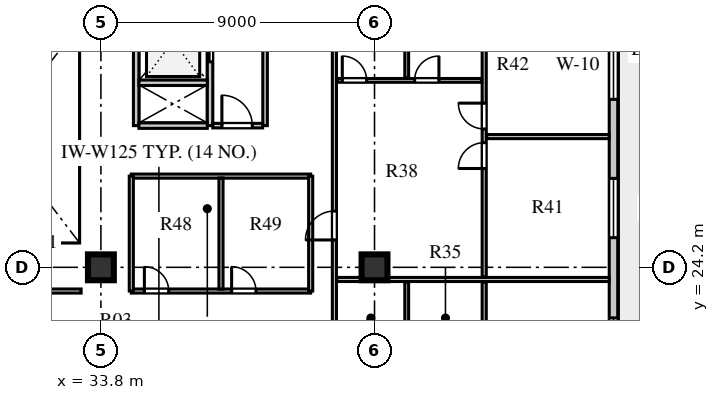
"""IFC4 building model, lengths in metres.
Left out: names, types, materials, properties, quantities, classifications, styles, units other than length and angle.
Written with IfcOpenShell. Run it as: python <this file> out.ifc"""

import sys

from ifc_helpers import new_model, si_unit, direction, frame, frame_2d, origin, origin_2d, place, context, subcontext, project, spatial, rectangle, extrude, element, fill, save


model = new_model("IFC4")
c1 = context("Model", 3, precision=1e-05, world=origin(), true_north=direction((0.0, 1.0)))
c2 = subcontext(c1, "Body", "Model", "MODEL_VIEW")
j1 = project(units=[si_unit("LENGTHUNIT", "METRE"), si_unit("PLANEANGLEUNIT", "RADIAN")], contexts=[c1])
p1 = place(None, origin())
s1 = spatial("IfcSite", under=j1, at=p1, CompositionType="ELEMENT")
p2 = place(p1, origin())
s2 = spatial("IfcBuilding", under=s1, at=p2, CompositionType="ELEMENT")
p3 = place(p2, frame((0.0, 0.0, 229.7)))
s3 = spatial("IfcBuildingStorey", under=s2, at=p3, CompositionType="ELEMENT", Elevation=229.7)
for number, where, z_axis, x_axis in (
    (1, (33.8, 24.2, 0.0), (0.0, 0.0, 1.0), (1.0, 0.0, 0.0)),
    (2, (42.8, 24.2, 0.0), (0.0, 0.0, 1.0), (1.0, 0.0, 0.0)),
):
    element("IfcColumn", number, at=place(p3, frame(where, z_axis=z_axis, x_axis=x_axis)), inside=s3, PredefinedType="COLUMN", context=c2, shape_type="SweptSolid", body=[
        extrude(rectangle(XDim=0.85, YDim=0.85, at=origin_2d()), origin(), (0.0, 0.0, 1.0), 3.66),
    ])
p4 = place(p3, frame((50.66, 13.13, 0.0), z_axis=(0.0, 0.0, 1.0), x_axis=(0.0, 1.0, 0.0)))
e3 = element("IfcWall", 3, at=p4, inside=s3, PredefinedType="STANDARD", context=c2, shape_type="SweptSolid", body=[
    extrude(rectangle(XDim=30.94, YDim=0.28, at=frame_2d((15.47, 0.0))), origin(), (0.0, 0.0, 1.0), 3.66),
])
p5 = place(p4, frame((0.67, 0.0, 0.0)))
e4 = element("IfcOpeningElement", 4, at=p5, cuts=e3, PredefinedType="OPENING", context=c2, shape_type="SweptSolid", body=[
    extrude(rectangle(XDim=1.0, YDim=2.05, at=frame_2d((0.5, 1.025))), frame((0.0, 0.15, 0.0), z_axis=(0.0, -1.0, 0.0), x_axis=(1.0, 0.0, 0.0)), (0.0, 0.0, 1.0), 0.3),
])
p6 = place(p4, frame((3.683, 0.0, 0.8)))
e5 = element("IfcOpeningElement", 5, at=p6, cuts=e3, PredefinedType="OPENING", context=c2, shape_type="SweptSolid", body=[
    extrude(rectangle(XDim=1.35, YDim=1.9, at=frame_2d((0.675, 0.95))), frame((0.0, 0.15, 0.0), z_axis=(0.0, -1.0, 0.0), x_axis=(1.0, 0.0, 0.0)), (0.0, 0.0, 1.0), 0.3),
])
p7 = place(p4, frame((7.757, 0.0, 0.8)))
e6 = element("IfcOpeningElement", 6, at=p7, cuts=e3, PredefinedType="OPENING", context=c2, shape_type="SweptSolid", body=[
    extrude(rectangle(XDim=1.65, YDim=1.95, at=frame_2d((0.825, 0.975))), frame((0.0, 0.15, 0.0), z_axis=(0.0, -1.0, 0.0), x_axis=(1.0, 0.0, 0.0)), (0.0, 0.0, 1.0), 0.3),
])
p8 = place(p4, frame((12.045, 0.0, 0.8)))
e7 = element("IfcOpeningElement", 7, at=p8, cuts=e3, PredefinedType="OPENING", context=c2, shape_type="SweptSolid", body=[
    extrude(rectangle(XDim=1.95, YDim=2.0, at=frame_2d((0.975, 1.0))), frame((0.0, 0.15, 0.0), z_axis=(0.0, -1.0, 0.0), x_axis=(1.0, 0.0, 0.0)), (0.0, 0.0, 1.0), 0.3),
])
p9 = place(p4, frame((16.595, 0.0, 0.8)))
e8 = element("IfcOpeningElement", 8, at=p9, cuts=e3, PredefinedType="OPENING", context=c2, shape_type="SweptSolid", body=[
    extrude(rectangle(XDim=2.25, YDim=2.0, at=frame_2d((1.125, 1.0))), frame((0.0, 0.15, 0.0), z_axis=(0.0, -1.0, 0.0), x_axis=(1.0, 0.0, 0.0)), (0.0, 0.0, 1.0), 0.3),
])
p10 = place(p4, frame((21.307, 0.0, 0.8)))
e9 = element("IfcOpeningElement", 9, at=p10, cuts=e3, PredefinedType="OPENING", context=c2, shape_type="SweptSolid", body=[
    extrude(rectangle(XDim=1.8, YDim=2.0, at=frame_2d((0.9, 1.0))), frame((0.0, 0.15, 0.0), z_axis=(0.0, -1.0, 0.0), x_axis=(1.0, 0.0, 0.0)), (0.0, 0.0, 1.0), 0.3),
])
p11 = place(p4, frame((25.782, 0.0, 0.8)))
e10 = element("IfcOpeningElement", 10, at=p11, cuts=e3, PredefinedType="OPENING", context=c2, shape_type="SweptSolid", body=[
    extrude(rectangle(XDim=1.5, YDim=2.0, at=frame_2d((0.75, 1.0))), frame((0.0, 0.15, 0.0), z_axis=(0.0, -1.0, 0.0), x_axis=(1.0, 0.0, 0.0)), (0.0, 0.0, 1.0), 0.3),
])
p12 = place(p4, frame((29.175, 0.0, 0.8)))
e11 = element("IfcOpeningElement", 11, at=p12, cuts=e3, PredefinedType="OPENING", context=c2, shape_type="SweptSolid", body=[
    extrude(rectangle(XDim=1.2, YDim=1.75, at=frame_2d((0.6, 0.875))), frame((0.0, 0.15, 0.0), z_axis=(0.0, -1.0, 0.0), x_axis=(1.0, 0.0, 0.0)), (0.0, 0.0, 1.0), 0.3),
])
p13 = place(p3, frame((34.96, 28.86, 0.0), z_axis=(0.0, 0.0, 1.0), x_axis=(0.0, 1.0, 0.0)))
e12 = element("IfcWall", 12, at=p13, inside=s3, PredefinedType="SOLIDWALL", context=c2, shape_type="SweptSolid", body=[
    extrude(rectangle(XDim=4.22, YDim=0.18, at=frame_2d((2.11, 0.0))), origin(), (0.0, 0.0, 1.0), 3.66),
])
p14 = place(p3, frame((37.39, 28.86, 0.0), z_axis=(0.0, 0.0, 1.0), x_axis=(0.0, 1.0, 0.0)))
e13 = element("IfcWall", 13, at=p14, inside=s3, PredefinedType="SOLIDWALL", context=c2, shape_type="SweptSolid", body=[
    extrude(rectangle(XDim=4.22, YDim=0.18, at=frame_2d((2.11, 0.0))), origin(), (0.0, 0.0, 1.0), 3.66),
])
p15 = place(p14, frame((2.1, 0.0, 0.0)))
e14 = element("IfcOpeningElement", 14, at=p15, cuts=e13, PredefinedType="OPENING", context=c2, shape_type="SweptSolid", body=[
    extrude(rectangle(XDim=1.2, YDim=2.12, at=frame_2d((0.6, 1.06))), frame((0.0, 0.1, 0.0), z_axis=(0.0, -1.0, 0.0), x_axis=(1.0, 0.0, 0.0)), (0.0, 0.0, 1.0), 0.2),
])
for number, where, z_axis, x_axis in (
    (15, (35.05, 28.86, 0.0), (0.0, 0.0, 1.0), (1.0, 0.0, 0.0)),
    (16, (35.05, 30.27, 0.0), (0.0, 0.0, 1.0), (1.0, 0.0, 0.0)),
):
    element("IfcWall", number, at=place(p3, frame(where, z_axis=z_axis, x_axis=x_axis)), inside=s3, PredefinedType="SOLIDWALL", context=c2, shape_type="SweptSolid", body=[
        extrude(rectangle(XDim=2.25, YDim=0.18, at=frame_2d((1.125, 0.0))), origin(), (0.0, 0.0, 1.0), 3.66),
    ])
p16 = place(p3, frame((39.2, 28.86, 0.0), z_axis=(0.0, 0.0, 1.0), x_axis=(0.0, 1.0, 0.0)))
e17 = element("IfcWall", 17, at=p16, inside=s3, PredefinedType="PARTITIONING", context=c2, shape_type="SweptSolid", body=[
    extrude(rectangle(XDim=4.22, YDim=0.15, at=frame_2d((2.11, 0.0))), origin(), (0.0, 0.0, 1.0), 3.66),
])
p17 = place(p3, frame((37.48, 28.86, 0.0), z_axis=(0.0, 0.0, 1.0), x_axis=(1.0, 0.0, 0.0)))
e18 = element("IfcWall", 18, at=p17, inside=s3, PredefinedType="PARTITIONING", context=c2, shape_type="SweptSolid", body=[
    extrude(rectangle(XDim=1.64, YDim=0.15, at=frame_2d((0.82, 0.0))), origin(), (0.0, 0.0, 1.0), 3.66),
])
p18 = place(p17, frame((0.3, 0.0, 0.0)))
e19 = element("IfcOpeningElement", 19, at=p18, cuts=e18, PredefinedType="OPENING", context=c2, shape_type="SweptSolid", body=[
    extrude(rectangle(XDim=1.0, YDim=2.1, at=frame_2d((0.5, 1.05))), frame((0.0, 0.085, 0.0), z_axis=(0.0, -1.0, 0.0), x_axis=(1.0, 0.0, 0.0)), (0.0, 0.0, 1.0), 0.17),
])
p19 = place(p3, frame((27.15, 23.42, 0.0), z_axis=(0.0, 0.0, 1.0), x_axis=(1.0, 0.0, 0.0)))
e20 = element("IfcWall", 20, at=p19, inside=s3, PredefinedType="PARTITIONING", context=c2, shape_type="SweptSolid", body=[
    extrude(rectangle(XDim=6.0, YDim=0.135, at=frame_2d((3.0, 0.0))), origin(), (0.0, 0.0, 1.0), 3.66),
])
p20 = place(p3, frame((41.48, 15.35, 0.0), z_axis=(0.0, 0.0, 1.0), x_axis=(0.0, 1.0, 0.0)))
e21 = element("IfcWall", 21, at=p20, inside=s3, PredefinedType="PARTITIONING", context=c2, shape_type="SweptSolid", body=[
    extrude(rectangle(XDim=26.5, YDim=0.135, at=frame_2d((13.25, 0.0))), origin(), (0.0, 0.0, 1.0), 3.66),
])
p21 = place(p20, frame((0.75, 0.0, 0.0)))
e22 = element("IfcOpeningElement", 22, at=p21, cuts=e21, PredefinedType="OPENING", context=c2, shape_type="SweptSolid", body=[
    extrude(rectangle(XDim=0.95, YDim=2.1, at=frame_2d((0.475, 1.05))), frame((0.0, 0.078, 0.0), z_axis=(0.0, -1.0, 0.0), x_axis=(1.0, 0.0, 0.0)), (0.0, 0.0, 1.0), 0.155),
])
p22 = place(p20, frame((9.75, 0.0, 0.0)))
e23 = element("IfcOpeningElement", 23, at=p22, cuts=e21, PredefinedType="OPENING", context=c2, shape_type="SweptSolid", body=[
    extrude(rectangle(XDim=0.95, YDim=2.1, at=frame_2d((0.475, 1.05))), frame((0.0, 0.078, 0.0), z_axis=(0.0, -1.0, 0.0), x_axis=(1.0, 0.0, 0.0)), (0.0, 0.0, 1.0), 0.155),
])
p23 = place(p20, frame((18.5, 0.0, 0.0)))
e24 = element("IfcOpeningElement", 24, at=p23, cuts=e21, PredefinedType="OPENING", context=c2, shape_type="SweptSolid", body=[
    extrude(rectangle(XDim=0.95, YDim=2.1, at=frame_2d((0.475, 1.05))), frame((0.0, 0.078, 0.0), z_axis=(0.0, -1.0, 0.0), x_axis=(1.0, 0.0, 0.0)), (0.0, 0.0, 1.0), 0.155),
])
p24 = place(p3, frame((46.408, 15.53, 0.0), z_axis=(0.0, 0.0, 1.0), x_axis=(0.0, 1.0, 0.0)))
e25 = element("IfcWall", 25, at=p24, inside=s3, PredefinedType="PARTITIONING", context=c2, shape_type="SweptSolid", body=[
    extrude(rectangle(XDim=8.19, YDim=0.135, at=frame_2d((4.095, 0.0))), origin(), (0.0, 0.0, 1.0), 3.66),
])
p25 = place(p24, frame((3.045, 0.0, 0.0)))
e26 = element("IfcOpeningElement", 26, at=p25, cuts=e25, PredefinedType="OPENING", context=c2, shape_type="SweptSolid", body=[
    extrude(rectangle(XDim=0.85, YDim=2.08, at=frame_2d((0.425, 1.04))), frame((0.0, 0.078, 0.0), z_axis=(0.0, -1.0, 0.0), x_axis=(1.0, 0.0, 0.0)), (0.0, 0.0, 1.0), 0.155),
])
p26 = place(p24, frame((4.345, 0.0, 0.0)))
e27 = element("IfcOpeningElement", 27, at=p26, cuts=e25, PredefinedType="OPENING", context=c2, shape_type="SweptSolid", body=[
    extrude(rectangle(XDim=0.85, YDim=2.08, at=frame_2d((0.425, 1.04))), frame((0.0, 0.078, 0.0), z_axis=(0.0, -1.0, 0.0), x_axis=(1.0, 0.0, 0.0)), (0.0, 0.0, 1.0), 0.155),
])
p27 = place(p3, frame((43.859, 21.343, 0.0), z_axis=(0.0, 0.0, 1.0), x_axis=(0.0, 1.0, 0.0)))
e28 = element("IfcWall", 28, at=p27, inside=s3, PredefinedType="PLUMBINGWALL", context=c2, shape_type="SweptSolid", body=[
    extrude(rectangle(XDim=2.377, YDim=0.125, at=frame_2d((1.188, 0.0))), origin(), (0.0, 0.0, 1.0), 3.66),
])
p28 = place(p3, frame((41.56, 23.8, 0.0), z_axis=(0.0, 0.0, 1.0), x_axis=(1.0, 0.0, 0.0)))
e29 = element("IfcWall", 29, at=p28, inside=s3, PredefinedType="PARTITIONING", context=c2, shape_type="SweptSolid", body=[
    extrude(rectangle(XDim=8.96, YDim=0.135, at=frame_2d((4.48, 0.0))), origin(), (0.0, 0.0, 1.0), 3.66),
])
p29 = place(p3, frame((46.408, 23.88, 0.0), z_axis=(0.0, 0.0, 1.0), x_axis=(0.0, 1.0, 0.0)))
e30 = element("IfcWall", 30, at=p29, inside=s3, PredefinedType="PARTITIONING", context=c2, shape_type="SweptSolid", body=[
    extrude(rectangle(XDim=9.24, YDim=0.135, at=frame_2d((4.62, 0.0))), origin(), (0.0, 0.0, 1.0), 3.66),
])
p30 = place(p29, frame((3.57, 0.0, 0.0)))
e31 = element("IfcOpeningElement", 31, at=p30, cuts=e30, PredefinedType="OPENING", context=c2, shape_type="SweptSolid", body=[
    extrude(rectangle(XDim=0.85, YDim=2.08, at=frame_2d((0.425, 1.04))), frame((0.0, 0.078, 0.0), z_axis=(0.0, -1.0, 0.0), x_axis=(1.0, 0.0, 0.0)), (0.0, 0.0, 1.0), 0.155),
])
p31 = place(p29, frame((4.87, 0.0, 0.0)))
e32 = element("IfcOpeningElement", 32, at=p31, cuts=e30, PredefinedType="OPENING", context=c2, shape_type="SweptSolid", body=[
    extrude(rectangle(XDim=0.85, YDim=2.08, at=frame_2d((0.425, 1.04))), frame((0.0, 0.078, 0.0), z_axis=(0.0, -1.0, 0.0), x_axis=(1.0, 0.0, 0.0)), (0.0, 0.0, 1.0), 0.155),
])
p32 = place(p3, frame((41.58, 30.348, 0.0), z_axis=(0.0, 0.0, 1.0), x_axis=(1.0, 0.0, 0.0)))
e33 = element("IfcWall", 33, at=p32, inside=s3, PredefinedType="PLUMBINGWALL", context=c2, shape_type="SweptSolid", body=[
    extrude(rectangle(XDim=4.748, YDim=0.125, at=frame_2d((2.374, 0.0))), origin(), (0.0, 0.0, 1.0), 3.66),
])
p33 = place(p32, frame((0.16, 0.0, 0.0)))
e34 = element("IfcOpeningElement", 34, at=p33, cuts=e33, PredefinedType="OPENING", context=c2, shape_type="SweptSolid", body=[
    extrude(rectangle(XDim=0.8, YDim=2.05, at=frame_2d((0.4, 1.025))), frame((0.0, 0.073, 0.0), z_axis=(0.0, -1.0, 0.0), x_axis=(1.0, 0.0, 0.0)), (0.0, 0.0, 1.0), 0.145),
])
p34 = place(p32, frame((2.539, 0.0, 0.0)))
e35 = element("IfcOpeningElement", 35, at=p34, cuts=e33, PredefinedType="OPENING", context=c2, shape_type="SweptSolid", body=[
    extrude(rectangle(XDim=0.8, YDim=2.05, at=frame_2d((0.4, 1.025))), frame((0.0, 0.073, 0.0), z_axis=(0.0, -1.0, 0.0), x_axis=(1.0, 0.0, 0.0)), (0.0, 0.0, 1.0), 0.145),
])
p35 = place(p3, frame((43.859, 30.428, 0.0), z_axis=(0.0, 0.0, 1.0), x_axis=(0.0, 1.0, 0.0)))
e36 = element("IfcWall", 36, at=p35, inside=s3, PredefinedType="PLUMBINGWALL", context=c2, shape_type="SweptSolid", body=[
    extrude(rectangle(XDim=2.692, YDim=0.125, at=frame_2d((1.346, 0.0))), origin(), (0.0, 0.0, 1.0), 3.66),
])
p36 = place(p3, frame((46.488, 28.5, 0.0), z_axis=(0.0, 0.0, 1.0), x_axis=(1.0, 0.0, 0.0)))
e37 = element("IfcWall", 37, at=p36, inside=s3, PredefinedType="PARTITIONING", context=c2, shape_type="SweptSolid", body=[
    extrude(rectangle(XDim=4.032, YDim=0.135, at=frame_2d((2.016, 0.0))), origin(), (0.0, 0.0, 1.0), 3.66),
])
p37 = place(p3, frame((34.8, 23.42, 0.0), z_axis=(0.0, 0.0, 1.0), x_axis=(1.0, 0.0, 0.0)))
e38 = element("IfcWall", 38, at=p37, inside=s3, PredefinedType="PARTITIONING", context=c2, shape_type="SweptSolid", body=[
    extrude(rectangle(XDim=5.9, YDim=0.135, at=frame_2d((2.95, 0.0))), origin(), (0.0, 0.0, 1.0), 3.66),
])
p38 = place(p37, frame((0.43, 0.0, 0.0)))
e39 = element("IfcOpeningElement", 39, at=p38, cuts=e38, PredefinedType="OPENING", context=c2, shape_type="SweptSolid", body=[
    extrude(rectangle(XDim=0.8, YDim=2.05, at=frame_2d((0.4, 1.025))), frame((0.0, 0.078, 0.0), z_axis=(0.0, -1.0, 0.0), x_axis=(1.0, 0.0, 0.0)), (0.0, 0.0, 1.0), 0.155),
])
p39 = place(p37, frame((3.3, 0.0, 0.0)))
e40 = element("IfcOpeningElement", 40, at=p39, cuts=e38, PredefinedType="OPENING", context=c2, shape_type="SweptSolid", body=[
    extrude(rectangle(XDim=0.8, YDim=2.05, at=frame_2d((0.4, 1.025))), frame((0.0, 0.078, 0.0), z_axis=(0.0, -1.0, 0.0), x_axis=(1.0, 0.0, 0.0)), (0.0, 0.0, 1.0), 0.155),
])
p40 = place(p3, frame((34.8, 27.2, 0.0), z_axis=(0.0, 0.0, 1.0), x_axis=(1.0, 0.0, 0.0)))
e41 = element("IfcWall", 41, at=p40, inside=s3, PredefinedType="PARTITIONING", context=c2, shape_type="SweptSolid", body=[
    extrude(rectangle(XDim=5.9, YDim=0.135, at=frame_2d((2.95, 0.0))), origin(), (0.0, 0.0, 1.0), 3.31),
])
for number, where, z_axis, x_axis in (
    (42, (34.8, 23.42, 0.0), (0.0, 0.0, 1.0), (0.0, 1.0, 0.0)),
    (43, (40.7, 23.42, 0.0), (0.0, 0.0, 1.0), (0.0, 1.0, 0.0)),
):
    element("IfcWall", number, at=place(p3, frame(where, z_axis=z_axis, x_axis=x_axis)), inside=s3, PredefinedType="PARTITIONING", context=c2, shape_type="SweptSolid", body=[
        extrude(rectangle(XDim=3.78, YDim=0.135, at=frame_2d((1.89, 0.0))), origin(), (0.0, 0.0, 1.0), 3.66),
    ])
p41 = place(p3, frame((37.75, 23.48, 0.0), z_axis=(0.0, 0.0, 1.0), x_axis=(0.0, 1.0, 0.0)))
e44 = element("IfcWall", 44, at=p41, inside=s3, PredefinedType="PARTITIONING", context=c2, shape_type="SweptSolid", body=[
    extrude(rectangle(XDim=3.66, YDim=0.135, at=frame_2d((1.83, 0.0))), origin(), (0.0, 0.0, 1.0), 3.66),
])
p42 = place(p7, origin())
e45 = element("IfcWindow", 45, at=p42, inside=s3, PartitioningType="SINGLE_PANEL", PredefinedType="WINDOW", context=c2, shape_type="SweptSolid", body=[
    extrude(rectangle(XDim=1.65, YDim=1.95, at=frame_2d((0.825, 0.975))), frame((0.0, 0.03, 0.0), z_axis=(0.0, -1.0, 0.0), x_axis=(1.0, 0.0, 0.0)), (0.0, 0.0, 1.0), 0.06),
])
fill(e6, e45)
p43 = place(p8, origin())
e46 = element("IfcWindow", 46, at=p43, inside=s3, PartitioningType="SINGLE_PANEL", PredefinedType="WINDOW", context=c2, shape_type="SweptSolid", body=[
    extrude(rectangle(XDim=1.95, YDim=2.0, at=frame_2d((0.975, 1.0))), frame((0.0, 0.03, 0.0), z_axis=(0.0, -1.0, 0.0), x_axis=(1.0, 0.0, 0.0)), (0.0, 0.0, 1.0), 0.06),
])
fill(e7, e46)
p44 = place(p9, origin())
e47 = element("IfcWindow", 47, at=p44, inside=s3, PartitioningType="SINGLE_PANEL", PredefinedType="WINDOW", context=c2, shape_type="SweptSolid", body=[
    extrude(rectangle(XDim=2.25, YDim=2.0, at=frame_2d((1.125, 1.0))), frame((0.0, 0.03, 0.0), z_axis=(0.0, -1.0, 0.0), x_axis=(1.0, 0.0, 0.0)), (0.0, 0.0, 1.0), 0.06),
])
fill(e8, e47)
p45 = place(p15, frame((1.2, 0.0, 0.0), z_axis=(0.0, 0.0, 1.0), x_axis=(-1.0, 0.0, 0.0)))
e48 = element("IfcDoor", 48, at=p45, inside=s3, OperationType="DOUBLE_DOOR_SLIDING", PredefinedType="DOOR", context=c2, shape_type="SweptSolid", body=[
    extrude(rectangle(XDim=1.2, YDim=2.12, at=frame_2d((0.6, 1.06))), frame((0.0, 0.025, 0.0), z_axis=(0.0, -1.0, 0.0), x_axis=(1.0, 0.0, 0.0)), (0.0, 0.0, 1.0), 0.05),
])
fill(e14, e48)
p46 = place(p18, origin())
e49 = element("IfcDoor", 49, at=p46, inside=s3, OperationType="SINGLE_SWING_LEFT", PredefinedType="DOOR", context=c2, shape_type="SweptSolid", body=[
    extrude(rectangle(XDim=1.0, YDim=2.1, at=frame_2d((0.5, 1.05))), frame((0.0, 0.025, 0.0), z_axis=(0.0, -1.0, 0.0), x_axis=(1.0, 0.0, 0.0)), (0.0, 0.0, 1.0), 0.05),
])
fill(e19, e49)
p47 = place(p33, origin())
e50 = element("IfcDoor", 50, at=p47, inside=s3, OperationType="SINGLE_SWING_LEFT", PredefinedType="DOOR", context=c2, shape_type="SweptSolid", body=[
    extrude(rectangle(XDim=0.8, YDim=2.05, at=frame_2d((0.4, 1.025))), frame((0.0, 0.025, 0.0), z_axis=(0.0, -1.0, 0.0), x_axis=(1.0, 0.0, 0.0)), (0.0, 0.0, 1.0), 0.05),
])
fill(e34, e50)
p48 = place(p34, origin())
e51 = element("IfcDoor", 51, at=p48, inside=s3, OperationType="SINGLE_SWING_RIGHT", PredefinedType="DOOR", context=c2, shape_type="SweptSolid", body=[
    extrude(rectangle(XDim=0.8, YDim=2.05, at=frame_2d((0.4, 1.025))), frame((0.0, 0.025, 0.0), z_axis=(0.0, -1.0, 0.0), x_axis=(1.0, 0.0, 0.0)), (0.0, 0.0, 1.0), 0.05),
])
fill(e35, e51)
p49 = place(p30, origin())
e52 = element("IfcDoor", 52, at=p49, inside=s3, OperationType="SINGLE_SWING_LEFT", PredefinedType="DOOR", context=c2, shape_type="SweptSolid", body=[
    extrude(rectangle(XDim=0.85, YDim=2.08, at=frame_2d((0.425, 1.04))), frame((0.0, 0.025, 0.0), z_axis=(0.0, -1.0, 0.0), x_axis=(1.0, 0.0, 0.0)), (0.0, 0.0, 1.0), 0.05),
])
fill(e31, e52)
p50 = place(p31, origin())
e53 = element("IfcDoor", 53, at=p50, inside=s3, OperationType="SINGLE_SWING_RIGHT", PredefinedType="DOOR", context=c2, shape_type="SweptSolid", body=[
    extrude(rectangle(XDim=0.85, YDim=2.08, at=frame_2d((0.425, 1.04))), frame((0.0, 0.025, 0.0), z_axis=(0.0, -1.0, 0.0), x_axis=(1.0, 0.0, 0.0)), (0.0, 0.0, 1.0), 0.05),
])
fill(e32, e53)
p51 = place(p22, origin())
e54 = element("IfcDoor", 54, at=p51, inside=s3, OperationType="SINGLE_SWING_LEFT", PredefinedType="DOOR", context=c2, shape_type="SweptSolid", body=[
    extrude(rectangle(XDim=0.95, YDim=2.1, at=frame_2d((0.475, 1.05))), frame((0.0, 0.025, 0.0), z_axis=(0.0, -1.0, 0.0), x_axis=(1.0, 0.0, 0.0)), (0.0, 0.0, 1.0), 0.05),
])
fill(e23, e54)
p52 = place(p38, origin())
e55 = element("IfcDoor", 55, at=p52, inside=s3, OperationType="SINGLE_SWING_LEFT", PredefinedType="DOOR", context=c2, shape_type="SweptSolid", body=[
    extrude(rectangle(XDim=0.8, YDim=2.05, at=frame_2d((0.4, 1.025))), frame((0.0, 0.025, 0.0), z_axis=(0.0, -1.0, 0.0), x_axis=(1.0, 0.0, 0.0)), (0.0, 0.0, 1.0), 0.05),
])
fill(e39, e55)
p53 = place(p39, origin())
e56 = element("IfcDoor", 56, at=p53, inside=s3, OperationType="SINGLE_SWING_LEFT", PredefinedType="DOOR", context=c2, shape_type="SweptSolid", body=[
    extrude(rectangle(XDim=0.8, YDim=2.05, at=frame_2d((0.4, 1.025))), frame((0.0, 0.025, 0.0), z_axis=(0.0, -1.0, 0.0), x_axis=(1.0, 0.0, 0.0)), (0.0, 0.0, 1.0), 0.05),
])
fill(e40, e56)
save(model, sys.argv[1])
